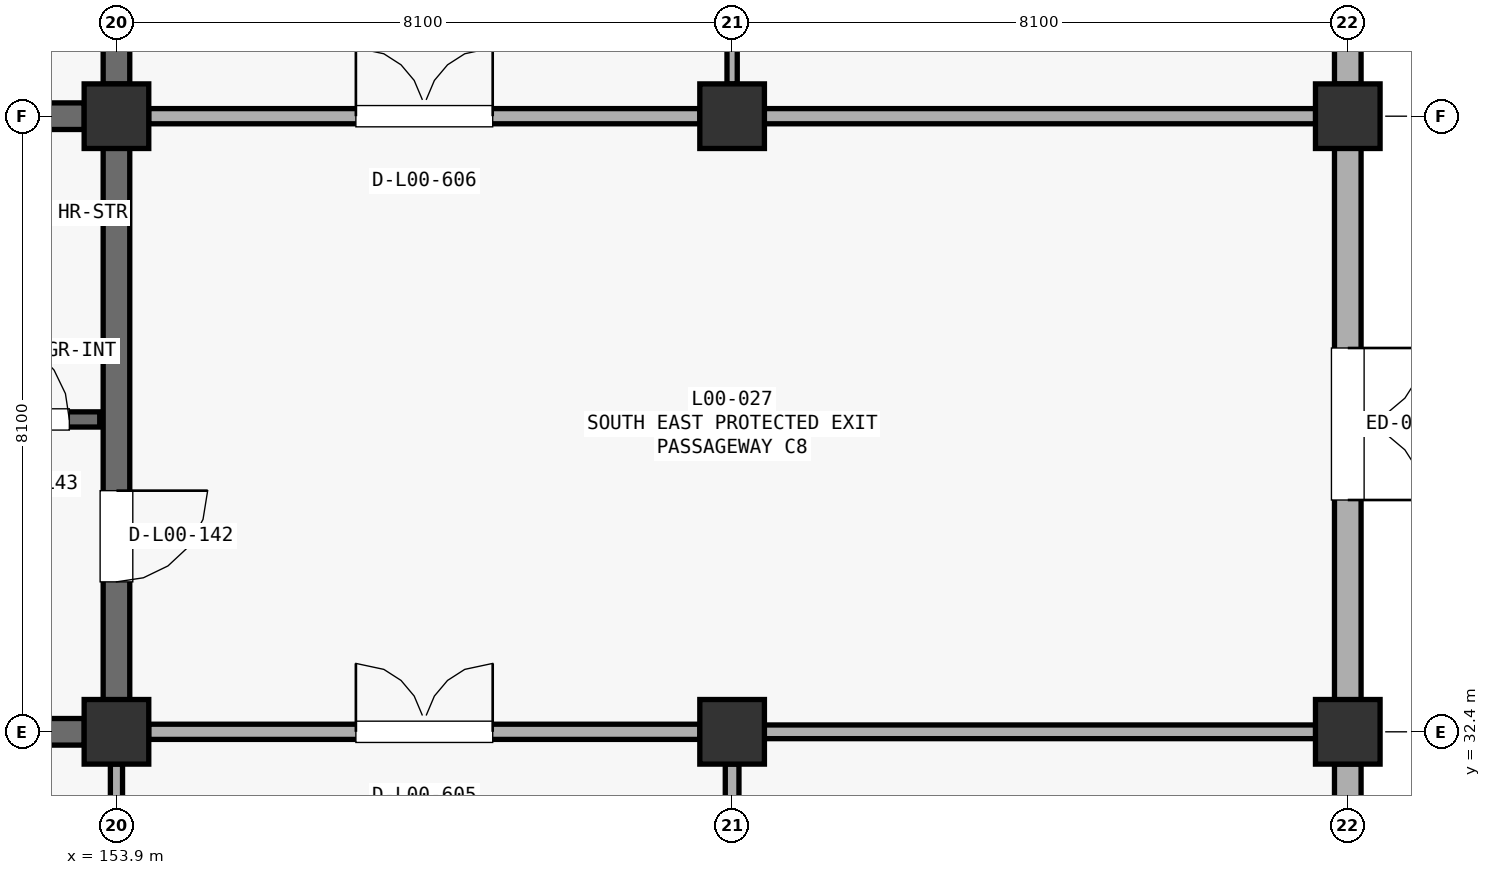
"""IFC4 building model, lengths in metres.
Left out: names, types, materials, properties, quantities, classifications, styles, units other than length and angle.
Written with IfcOpenShell. Run it as: python <this file> out.ifc"""

import sys

from ifc_helpers import new_model, si_unit, direction, frame, frame_2d, origin, origin_2d, place, context, subcontext, project, spatial, rectangle, extrude, element, fill, save


model = new_model("IFC4")
c1 = context("Model", 3, precision=1e-05, world=origin(), true_north=direction((0.0, 1.0)))
c2 = subcontext(c1, "Body", "Model", "MODEL_VIEW")
j1 = project(units=[si_unit("LENGTHUNIT", "METRE"), si_unit("PLANEANGLEUNIT", "RADIAN")], contexts=[c1])
p1 = place(None, origin())
s1 = spatial("IfcSite", under=j1, at=p1, CompositionType="ELEMENT")
p2 = place(p1, origin())
s2 = spatial("IfcBuilding", under=s1, at=p2, CompositionType="ELEMENT")
p3 = place(p2, origin())
s3 = spatial("IfcBuildingStorey", under=s2, at=p3, CompositionType="ELEMENT", Elevation=0.0)
for number, where, z_axis, x_axis in (
    (1, (153.9, 32.4, 0.0), (0.0, 0.0, 1.0), (1.0, 0.0, 0.0)),
    (2, (153.9, 40.5, 0.0), (0.0, 0.0, 1.0), (1.0, 0.0, 0.0)),
    (3, (162.0, 32.4, 0.0), (0.0, 0.0, 1.0), (1.0, 0.0, 0.0)),
    (4, (162.0, 40.5, 0.0), (0.0, 0.0, 1.0), (1.0, 0.0, 0.0)),
    (5, (170.1, 32.4, 0.0), (0.0, 0.0, 1.0), (1.0, 0.0, 0.0)),
    (6, (170.1, 40.5, 0.0), (0.0, 0.0, 1.0), (1.0, 0.0, 0.0)),
):
    element("IfcColumn", number, at=place(p3, frame(where, z_axis=z_axis, x_axis=x_axis)), inside=s3, PredefinedType="COLUMN", context=c2, shape_type="SweptSolid", body=[
        extrude(rectangle(XDim=0.85, YDim=0.85, at=origin_2d()), origin(), (0.0, 0.0, 1.0), 5.1),
    ])
p4 = place(p3, frame((170.1, 24.723, 0.0), z_axis=(0.0, 0.0, 1.0), x_axis=(0.0, 1.0, 0.0)))
e7 = element("IfcWall", 7, at=p4, inside=s3, PredefinedType="STANDARD", context=c2, shape_type="SweptSolid", body=[
    extrude(rectangle(XDim=7.254, YDim=0.35, at=frame_2d((3.627, 0.0))), origin(), (0.0, 0.0, 1.0), 4.172),
])
p5 = place(p4, frame((2.327, 0.0, 0.85)))
e8 = element("IfcOpeningElement", 8, at=p5, cuts=e7, PredefinedType="OPENING", context=c2, shape_type="SweptSolid", body=[
    extrude(rectangle(XDim=2.6, YDim=1.95, at=frame_2d((1.3, 0.975))), frame((0.0, 0.185, 0.0), z_axis=(0.0, -1.0, 0.0), x_axis=(1.0, 0.0, 0.0)), (0.0, 0.0, 1.0), 0.37),
])
p6 = place(p3, frame((170.1, 32.823, 0.0), z_axis=(0.0, 0.0, 1.0), x_axis=(0.0, 1.0, 0.0)))
e9 = element("IfcWall", 9, at=p6, inside=s3, PredefinedType="STANDARD", context=c2, shape_type="SweptSolid", body=[
    extrude(rectangle(XDim=7.254, YDim=0.35, at=frame_2d((3.627, 0.0))), origin(), (0.0, 0.0, 1.0), 4.222),
])
p7 = place(p6, frame((4.627, 0.0, 0.0), z_axis=(0.0, 0.0, 1.0), x_axis=(-1.0, 0.0, 0.0)))
e10 = element("IfcOpeningElement", 10, at=p7, cuts=e9, PredefinedType="OPENING", context=c2, shape_type="SweptSolid", body=[
    extrude(rectangle(XDim=2.0, YDim=2.2, at=frame_2d((1.0, 1.1))), frame((0.0, 0.185, 0.0), z_axis=(0.0, -1.0, 0.0), x_axis=(1.0, 0.0, 0.0)), (0.0, 0.0, 1.0), 0.37),
])
p8 = place(p3, frame((170.1, 40.923, 0.0), z_axis=(0.0, 0.0, 1.0), x_axis=(0.0, 1.0, 0.0)))
e11 = element("IfcWall", 11, at=p8, inside=s3, PredefinedType="STANDARD", context=c2, shape_type="SweptSolid", body=[
    extrude(rectangle(XDim=7.254, YDim=0.35, at=frame_2d((3.627, 0.0))), origin(), (0.0, 0.0, 1.0), 3.972),
])
p9 = place(p8, frame((2.527, 0.0, 0.85)))
e12 = element("IfcOpeningElement", 12, at=p9, cuts=e11, PredefinedType="OPENING", context=c2, shape_type="SweptSolid", body=[
    extrude(rectangle(XDim=2.2, YDim=1.95, at=frame_2d((1.1, 0.975))), frame((0.0, 0.185, 0.0), z_axis=(0.0, -1.0, 0.0), x_axis=(1.0, 0.0, 0.0)), (0.0, 0.0, 1.0), 0.37),
])
p10 = place(p3, frame((146.223, 40.5, 0.0), z_axis=(0.0, 0.0, 1.0), x_axis=(1.0, 0.0, 0.0)))
e13 = element("IfcWall", 13, at=p10, inside=s3, PredefinedType="SHEAR", context=c2, shape_type="SweptSolid", body=[
    extrude(rectangle(XDim=7.254, YDim=0.35, at=frame_2d((3.627, 0.0))), origin(), (0.0, 0.0, 1.0), 4.822),
])
p11 = place(p3, frame((153.9, 32.823, 0.0), z_axis=(0.0, 0.0, 1.0), x_axis=(0.0, 1.0, 0.0)))
e14 = element("IfcWall", 14, at=p11, inside=s3, PredefinedType="SHEAR", context=c2, shape_type="SweptSolid", body=[
    extrude(rectangle(XDim=7.254, YDim=0.35, at=frame_2d((3.627, 0.0))), origin(), (0.0, 0.0, 1.0), 4.822),
])
p12 = place(p11, frame((2.75, 0.0, 0.0), z_axis=(0.0, 0.0, 1.0), x_axis=(-1.0, 0.0, 0.0)))
e15 = element("IfcOpeningElement", 15, at=p12, cuts=e14, PredefinedType="OPENING", context=c2, shape_type="SweptSolid", body=[
    extrude(rectangle(XDim=1.2, YDim=2.2, at=frame_2d((0.6, 1.1))), frame((0.0, 0.185, 0.0), z_axis=(0.0, -1.0, 0.0), x_axis=(1.0, 0.0, 0.0)), (0.0, 0.0, 1.0), 0.37),
])
p13 = place(p3, frame((146.223, 32.4, 0.0), z_axis=(0.0, 0.0, 1.0), x_axis=(1.0, 0.0, 0.0)))
e16 = element("IfcWall", 16, at=p13, inside=s3, PredefinedType="SHEAR", context=c2, shape_type="SweptSolid", body=[
    extrude(rectangle(XDim=7.254, YDim=0.35, at=frame_2d((3.627, 0.0))), origin(), (0.0, 0.0, 1.0), 4.822),
])
p14 = place(p3, frame((146.02, 36.51, 0.0), z_axis=(0.0, 0.0, 1.0), x_axis=(1.0, 0.0, 0.0)))
e17 = element("IfcWall", 17, at=p14, inside=s3, PredefinedType="SHEAR", context=c2, shape_type="SweptSolid", body=[
    extrude(rectangle(XDim=7.66, YDim=0.2, at=frame_2d((3.83, 0.0))), origin(), (0.0, 0.0, 1.0), 4.822),
])
p15 = place(p14, frame((6.11, 0.0, 0.0)))
e18 = element("IfcOpeningElement", 18, at=p15, cuts=e17, PredefinedType="OPENING", context=c2, shape_type="SweptSolid", body=[
    extrude(rectangle(XDim=1.15, YDim=2.2, at=frame_2d((0.575, 1.1))), frame((0.0, 0.11, 0.0), z_axis=(0.0, -1.0, 0.0), x_axis=(1.0, 0.0, 0.0)), (0.0, 0.0, 1.0), 0.22),
])
p16 = place(p3, frame((153.9, 40.923, 0.0), z_axis=(0.0, 0.0, 1.0), x_axis=(0.0, 1.0, 0.0)))
e19 = element("IfcWall", 19, at=p16, inside=s3, PredefinedType="SHEAR", context=c2, shape_type="SweptSolid", body=[
    extrude(rectangle(XDim=7.254, YDim=0.35, at=frame_2d((3.627, 0.0))), origin(), (0.0, 0.0, 1.0), 4.822),
])
p17 = place(p16, frame((2.75, 0.0, 0.0), z_axis=(0.0, 0.0, 1.0), x_axis=(-1.0, 0.0, 0.0)))
e20 = element("IfcOpeningElement", 20, at=p17, cuts=e19, PredefinedType="OPENING", context=c2, shape_type="SweptSolid", body=[
    extrude(rectangle(XDim=1.2, YDim=2.2, at=frame_2d((0.6, 1.1))), frame((0.0, 0.185, 0.0), z_axis=(0.0, -1.0, 0.0), x_axis=(1.0, 0.0, 0.0)), (0.0, 0.0, 1.0), 0.37),
])
p18 = place(p3, frame((153.9, 24.723, 0.0), z_axis=(0.0, 0.0, 1.0), x_axis=(0.0, 1.0, 0.0)))
e21 = element("IfcWall", 21, at=p18, inside=s3, PredefinedType="PARTITIONING", context=c2, shape_type="SweptSolid", body=[
    extrude(rectangle(XDim=7.254, YDim=0.16, at=frame_2d((3.627, 0.0))), origin(), (0.0, 0.0, 1.0), 4.222),
])
p19 = place(p3, frame((162.0, 24.723, 0.0), z_axis=(0.0, 0.0, 1.0), x_axis=(0.0, 1.0, 0.0)))
e22 = element("IfcWall", 22, at=p19, inside=s3, PredefinedType="PARTITIONING", context=c2, shape_type="SweptSolid", body=[
    extrude(rectangle(XDim=7.254, YDim=0.18, at=frame_2d((3.627, 0.0))), origin(), (0.0, 0.0, 1.0), 3.872),
])
p20 = place(p3, frame((162.423, 32.4, 0.0), z_axis=(0.0, 0.0, 1.0), x_axis=(1.0, 0.0, 0.0)))
e23 = element("IfcWall", 23, at=p20, inside=s3, PredefinedType="PARTITIONING", context=c2, shape_type="SweptSolid", body=[
    extrude(rectangle(XDim=7.254, YDim=0.18, at=frame_2d((3.627, 0.0))), origin(), (0.0, 0.0, 1.0), 4.072),
])
p21 = place(p3, frame((162.0, 40.923, 0.0), z_axis=(0.0, 0.0, 1.0), x_axis=(0.0, 1.0, 0.0)))
e24 = element("IfcWall", 24, at=p21, inside=s3, PredefinedType="PARTITIONING", context=c2, shape_type="SweptSolid", body=[
    extrude(rectangle(XDim=7.254, YDim=0.135, at=frame_2d((3.627, 0.0))), origin(), (0.0, 0.0, 1.0), 4.172),
])
p22 = place(p21, frame((3.147, 0.0, 0.0)))
e25 = element("IfcOpeningElement", 25, at=p22, cuts=e24, PredefinedType="OPENING", context=c2, shape_type="SweptSolid", body=[
    extrude(rectangle(XDim=0.96, YDim=2.15, at=frame_2d((0.48, 1.075))), frame((0.0, 0.078, 0.0), z_axis=(0.0, -1.0, 0.0), x_axis=(1.0, 0.0, 0.0)), (0.0, 0.0, 1.0), 0.155),
])
p23 = place(p3, frame((162.423, 40.5, 0.0), z_axis=(0.0, 0.0, 1.0), x_axis=(1.0, 0.0, 0.0)))
e26 = element("IfcWall", 26, at=p23, inside=s3, PredefinedType="PARTITIONING", context=c2, shape_type="SweptSolid", body=[
    extrude(rectangle(XDim=7.254, YDim=0.2, at=frame_2d((3.627, 0.0))), origin(), (0.0, 0.0, 1.0), 4.172),
])
p24 = place(p3, frame((154.323, 32.4, 0.0), z_axis=(0.0, 0.0, 1.0), x_axis=(1.0, 0.0, 0.0)))
e27 = element("IfcWall", 27, at=p24, inside=s3, PredefinedType="PARTITIONING", context=c2, shape_type="SweptSolid", body=[
    extrude(rectangle(XDim=7.254, YDim=0.2, at=frame_2d((3.627, 0.0))), origin(), (0.0, 0.0, 1.0), 3.872),
])
p25 = place(p24, frame((2.727, 0.0, 0.0)))
e28 = element("IfcOpeningElement", 28, at=p25, cuts=e27, PredefinedType="OPENING", context=c2, shape_type="SweptSolid", body=[
    extrude(rectangle(XDim=1.8, YDim=2.2, at=frame_2d((0.9, 1.1))), frame((0.0, 0.11, 0.0), z_axis=(0.0, -1.0, 0.0), x_axis=(1.0, 0.0, 0.0)), (0.0, 0.0, 1.0), 0.22),
])
p26 = place(p3, frame((154.323, 40.5, 0.0), z_axis=(0.0, 0.0, 1.0), x_axis=(1.0, 0.0, 0.0)))
e29 = element("IfcWall", 29, at=p26, inside=s3, PredefinedType="PARTITIONING", context=c2, shape_type="SweptSolid", body=[
    extrude(rectangle(XDim=7.254, YDim=0.2, at=frame_2d((3.627, 0.0))), origin(), (0.0, 0.0, 1.0), 4.072),
])
p27 = place(p26, frame((2.727, 0.0, 0.0)))
e30 = element("IfcOpeningElement", 30, at=p27, cuts=e29, PredefinedType="OPENING", context=c2, shape_type="SweptSolid", body=[
    extrude(rectangle(XDim=1.8, YDim=2.2, at=frame_2d((0.9, 1.1))), frame((0.0, 0.11, 0.0), z_axis=(0.0, -1.0, 0.0), x_axis=(1.0, 0.0, 0.0)), (0.0, 0.0, 1.0), 0.22),
])
p28 = place(p7, origin())
e31 = element("IfcDoor", 31, at=p28, inside=s3, OperationType="DOUBLE_SWING_LEFT", PredefinedType="DOOR", context=c2, shape_type="SweptSolid", body=[
    extrude(rectangle(XDim=2.0, YDim=2.2, at=frame_2d((1.0, 1.1))), frame((0.0, 0.025, 0.0), z_axis=(0.0, -1.0, 0.0), x_axis=(1.0, 0.0, 0.0)), (0.0, 0.0, 1.0), 0.05),
])
fill(e10, e31)
p29 = place(p12, origin())
e32 = element("IfcDoor", 32, at=p29, inside=s3, OperationType="SINGLE_SWING_RIGHT", PredefinedType="DOOR", context=c2, shape_type="SweptSolid", body=[
    extrude(rectangle(XDim=1.2, YDim=2.2, at=frame_2d((0.6, 1.1))), frame((0.0, 0.025, 0.0), z_axis=(0.0, -1.0, 0.0), x_axis=(1.0, 0.0, 0.0)), (0.0, 0.0, 1.0), 0.05),
])
fill(e15, e32)
p30 = place(p15, origin())
e33 = element("IfcDoor", 33, at=p30, inside=s3, OperationType="SINGLE_SWING_LEFT", PredefinedType="DOOR", context=c2, shape_type="SweptSolid", body=[
    extrude(rectangle(XDim=1.15, YDim=2.2, at=frame_2d((0.575, 1.1))), frame((0.0, 0.025, 0.0), z_axis=(0.0, -1.0, 0.0), x_axis=(1.0, 0.0, 0.0)), (0.0, 0.0, 1.0), 0.05),
])
fill(e18, e33)
p31 = place(p25, origin())
e34 = element("IfcDoor", 34, at=p31, inside=s3, OperationType="DOUBLE_SWING_LEFT", PredefinedType="DOOR", context=c2, shape_type="SweptSolid", body=[
    extrude(rectangle(XDim=1.8, YDim=2.2, at=frame_2d((0.9, 1.1))), frame((0.0, 0.025, 0.0), z_axis=(0.0, -1.0, 0.0), x_axis=(1.0, 0.0, 0.0)), (0.0, 0.0, 1.0), 0.05),
])
fill(e28, e34)
p32 = place(p27, origin())
e35 = element("IfcDoor", 35, at=p32, inside=s3, OperationType="DOUBLE_SWING_LEFT", PredefinedType="DOOR", context=c2, shape_type="SweptSolid", body=[
    extrude(rectangle(XDim=1.8, YDim=2.2, at=frame_2d((0.9, 1.1))), frame((0.0, 0.025, 0.0), z_axis=(0.0, -1.0, 0.0), x_axis=(1.0, 0.0, 0.0)), (0.0, 0.0, 1.0), 0.05),
])
fill(e30, e35)
save(model, sys.argv[1])
